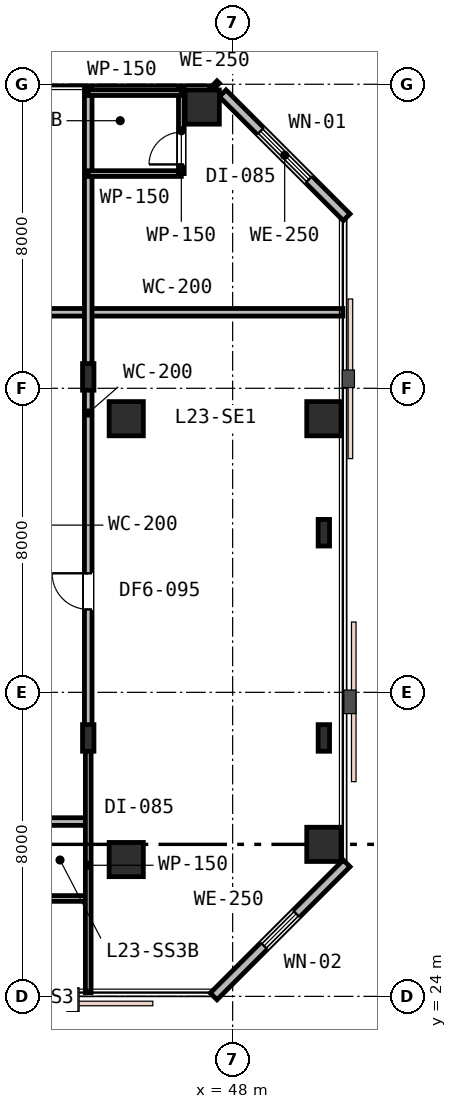
"""IFC4 building model, lengths in metres.
Left out: names, types, materials, properties, quantities, classifications, styles, units other than length and angle.
Written with IfcOpenShell. Run it as: python <this file> out.ifc"""

import sys

from ifc_helpers import new_model, si_unit, direction, frame, frame_2d, origin, origin_2d, place, context, subcontext, project, spatial, rectangle, i_section, extrude, element, fill, save


model = new_model("IFC4")
c1 = context("Model", 3, precision=1e-05, world=origin(), true_north=direction((0.0, 1.0)))
c2 = subcontext(c1, "Body", "Model", "MODEL_VIEW")
j1 = project(units=[si_unit("LENGTHUNIT", "METRE"), si_unit("PLANEANGLEUNIT", "RADIAN")], contexts=[c1])
p1 = place(None, origin())
s1 = spatial("IfcSite", under=j1, at=p1, CompositionType="ELEMENT")
p2 = place(p1, origin())
s2 = spatial("IfcBuilding", under=s1, at=p2, CompositionType="ELEMENT")
p3 = place(p2, frame((0.0, 0.0, 93.6)))
s3 = spatial("IfcBuildingStorey", under=s2, at=p3, CompositionType="ELEMENT", Elevation=93.6)
for number, where, z_axis, x_axis in (
    (1, (45.2, 27.6, 0.0), (0.0, 0.0, 1.0), (1.0, 0.0, 0.0)),
    (2, (45.2, 39.2, 0.0), (0.0, 0.0, 1.0), (1.0, 0.0, 0.0)),
    (3, (47.2, 47.4, 0.0), (0.0, 0.0, 1.0), (1.0, 0.0, 0.0)),
    (4, (50.4, 28.0, 0.0), (0.0, 0.0, 1.0), (1.0, 0.0, 0.0)),
    (5, (50.4, 39.2, 0.0), (0.0, 0.0, 1.0), (1.0, 0.0, 0.0)),
):
    element("IfcColumn", number, at=place(p3, frame(where, z_axis=z_axis, x_axis=x_axis)), inside=s3, PredefinedType="COLUMN", context=c2, shape_type="SweptSolid", body=[
        extrude(rectangle(XDim=0.9, YDim=0.9, at=origin_2d()), origin(), (0.0, 0.0, 1.0), 3.6),
    ])
for number, where, z_axis, x_axis in (
    (6, (44.2, 30.8, 0.0), (0.0, 0.0, 1.0), (1.0, 0.0, 0.0)),
    (7, (44.2, 40.3, 0.0), (0.0, 0.0, 1.0), (1.0, 0.0, 0.0)),
    (8, (50.4, 30.8, 0.0), (0.0, 0.0, 1.0), (1.0, 0.0, 0.0)),
    (9, (50.4, 36.2, 0.0), (0.0, 0.0, 1.0), (1.0, 0.0, 0.0)),
):
    element("IfcColumn", number, at=place(p3, frame(where, z_axis=z_axis, x_axis=x_axis)), inside=s3, PredefinedType="COLUMN", context=c2, shape_type="SweptSolid", body=[
        extrude(i_section(OverallWidth=0.3, OverallDepth=0.7, WebThickness=0.017, FlangeThickness=0.032, FilletRadius=0.027, at=origin_2d()), origin(), (0.0, 0.0, 1.0), 3.6),
    ])
p4 = place(p3, frame((47.5, 24.0, 0.0), z_axis=(0.0, 0.0, 1.0), x_axis=(0.707106781187, 0.707106781187, 0.0)))
e10 = element("IfcWall", 10, at=p4, inside=s3, PredefinedType="STANDARD", context=c2, shape_type="SweptSolid", body=[
    extrude(rectangle(XDim=4.95, YDim=0.25, at=frame_2d((2.475, 0.0))), origin(), (0.0, 0.0, 1.0), 3.33),
])
p5 = place(p4, frame((1.875, 0.0, 0.85)))
e11 = element("IfcOpeningElement", 11, at=p5, cuts=e10, PredefinedType="OPENING", context=c2, shape_type="SweptSolid", body=[
    extrude(rectangle(XDim=1.2, YDim=1.6, at=frame_2d((0.6, 0.8))), frame((0.0, 0.135, 0.0), z_axis=(0.0, -1.0, 0.0), x_axis=(1.0, 0.0, 0.0)), (0.0, 0.0, 1.0), 0.27),
])
p6 = place(p3, frame((51.0, 44.5, 0.0), z_axis=(0.0, 0.0, 1.0), x_axis=(-0.707106781187, 0.707106781187, 0.0)))
e12 = element("IfcWall", 12, at=p6, inside=s3, PredefinedType="STANDARD", context=c2, shape_type="SweptSolid", body=[
    extrude(rectangle(XDim=4.613, YDim=0.25, at=frame_2d((2.306, 0.0))), origin(), (0.0, 0.0, 1.0), 3.33),
])
p7 = place(p6, frame((1.406, 0.0, 0.75)))
e13 = element("IfcOpeningElement", 13, at=p7, cuts=e12, PredefinedType="OPENING", context=c2, shape_type="SweptSolid", body=[
    extrude(rectangle(XDim=1.8, YDim=1.85, at=frame_2d((0.9, 0.925))), frame((0.0, 0.135, 0.0), z_axis=(0.0, -1.0, 0.0), x_axis=(1.0, 0.0, 0.0)), (0.0, 0.0, 1.0), 0.27),
])
p8 = place(p3, frame((47.562, 47.938, 0.0), z_axis=(0.0, 0.0, 1.0), x_axis=(-0.707106781187, 0.707106781187, 0.0)))
e14 = element("IfcWall", 14, at=p8, inside=s3, PredefinedType="STANDARD", context=c2, shape_type="SweptSolid", body=[
    extrude(rectangle(XDim=0.087, YDim=0.25, at=frame_2d((0.044, 0.0))), origin(), (0.0, 0.0, 1.0), 3.33),
])
p9 = place(p3, frame((11.4, 28.6, 0.0), z_axis=(0.0, 0.0, 1.0), x_axis=(1.0, 0.0, 0.0)))
e15 = element("IfcWall", 15, at=p9, inside=s3, PredefinedType="PARTITIONING", context=c2, shape_type="SweptSolid", body=[
    extrude(rectangle(XDim=32.8, YDim=0.2, at=frame_2d((16.4, 0.0))), origin(), (0.0, 0.0, 1.0), 2.83),
])
p10 = place(p9, frame((14.7, 0.0, 0.0)))
e16 = element("IfcOpeningElement", 16, at=p10, cuts=e15, PredefinedType="OPENING", context=c2, shape_type="SweptSolid", body=[
    extrude(rectangle(XDim=0.95, YDim=2.15, at=frame_2d((0.475, 1.075))), frame((0.0, 0.11, 0.0), z_axis=(0.0, -1.0, 0.0), x_axis=(1.0, 0.0, 0.0)), (0.0, 0.0, 1.0), 0.22),
])
p11 = place(p9, frame((22.475, 0.0, 0.0)))
e17 = element("IfcOpeningElement", 17, at=p11, cuts=e15, PredefinedType="OPENING", context=c2, shape_type="SweptSolid", body=[
    extrude(rectangle(XDim=0.95, YDim=2.15, at=frame_2d((0.475, 1.075))), frame((0.0, 0.11, 0.0), z_axis=(0.0, -1.0, 0.0), x_axis=(1.0, 0.0, 0.0)), (0.0, 0.0, 1.0), 0.22),
])
p12 = place(p9, frame((28.985, 0.0, 0.0)))
e18 = element("IfcOpeningElement", 18, at=p12, cuts=e15, PredefinedType="OPENING", context=c2, shape_type="SweptSolid", body=[
    extrude(rectangle(XDim=0.95, YDim=2.15, at=frame_2d((0.475, 1.075))), frame((0.0, 0.11, 0.0), z_axis=(0.0, -1.0, 0.0), x_axis=(1.0, 0.0, 0.0)), (0.0, 0.0, 1.0), 0.22),
])
p13 = place(p3, frame((42.2, 42.0, 0.0), z_axis=(0.0, 0.0, 1.0), x_axis=(1.0, 0.0, 0.0)))
e19 = element("IfcWall", 19, at=p13, inside=s3, PredefinedType="PARTITIONING", context=c2, shape_type="SweptSolid", body=[
    extrude(rectangle(XDim=8.7, YDim=0.2, at=frame_2d((4.35, 0.0))), origin(), (0.0, 0.0, 1.0), 3.33),
])
p14 = place(p3, frame((42.35, 26.576, 0.0), z_axis=(0.0, 0.0, 1.0), x_axis=(1.0, 0.0, 0.0)))
e20 = element("IfcWall", 20, at=p14, inside=s3, PredefinedType="PARTITIONING", context=c2, shape_type="SweptSolid", body=[
    extrude(rectangle(XDim=1.85, YDim=0.15, at=frame_2d((0.925, 0.0))), origin(), (0.0, 0.0, 1.0), 3.33),
])
p15 = place(p3, frame((44.2, 30.8, 0.0), z_axis=(0.0, 0.0, 1.0), x_axis=(0.0, -1.0, 0.0)))
e21 = element("IfcWall", 21, at=p15, inside=s3, PredefinedType="PARTITIONING", context=c2, shape_type="SweptSolid", body=[
    extrude(rectangle(XDim=6.7, YDim=0.15, at=frame_2d((3.35, 0.0))), origin(), (0.0, 0.0, 1.0), 2.83),
])
p16 = place(p3, frame((44.2, 30.8, 0.0), z_axis=(0.0, 0.0, 1.0), x_axis=(0.0, 1.0, 0.0)))
e22 = element("IfcWall", 22, at=p16, inside=s3, PredefinedType="PARTITIONING", context=c2, shape_type="SweptSolid", body=[
    extrude(rectangle(XDim=17.1, YDim=0.2, at=frame_2d((8.55, 0.0))), origin(), (0.0, 0.0, 1.0), 2.83),
])
p17 = place(p16, frame((3.382, 0.0, 0.0)))
e23 = element("IfcOpeningElement", 23, at=p17, cuts=e22, PredefinedType="OPENING", context=c2, shape_type="SweptSolid", body=[
    extrude(rectangle(XDim=0.95, YDim=2.15, at=frame_2d((0.475, 1.075))), frame((0.0, 0.11, 0.0), z_axis=(0.0, -1.0, 0.0), x_axis=(1.0, 0.0, 0.0)), (0.0, 0.0, 1.0), 0.22),
])
p18 = place(p3, frame((44.2, 45.65, 0.0), z_axis=(0.0, 0.0, 1.0), x_axis=(1.0, 0.0, 0.0)))
e24 = element("IfcWall", 24, at=p18, inside=s3, PredefinedType="PARTITIONING", context=c2, shape_type="SweptSolid", body=[
    extrude(rectangle(XDim=2.45, YDim=0.15, at=frame_2d((1.225, 0.0))), origin(), (0.0, 0.0, 1.0), 3.33),
])
p19 = place(p3, frame((46.65, 45.65, 0.0), z_axis=(0.0, 0.0, 1.0), x_axis=(0.0, 1.0, 0.0)))
e25 = element("IfcWall", 25, at=p19, inside=s3, PredefinedType="PARTITIONING", context=c2, shape_type="SweptSolid", body=[
    extrude(rectangle(XDim=2.25, YDim=0.15, at=frame_2d((1.125, 0.0))), origin(), (0.0, 0.0, 1.0), 2.92),
])
p20 = place(p19, frame((0.24, 0.0, 0.0)))
e26 = element("IfcOpeningElement", 26, at=p20, cuts=e25, PredefinedType="OPENING", context=c2, shape_type="SweptSolid", body=[
    extrude(rectangle(XDim=0.85, YDim=2.15, at=frame_2d((0.425, 1.075))), frame((0.0, 0.085, 0.0), z_axis=(0.0, -1.0, 0.0), x_axis=(1.0, 0.0, 0.0)), (0.0, 0.0, 1.0), 0.17),
])
p21 = place(p3, frame((44.2, 47.78, 0.0), z_axis=(0.0, 0.0, 1.0), x_axis=(1.0, 0.0, 0.0)))
e27 = element("IfcWall", 27, at=p21, inside=s3, PredefinedType="PARTITIONING", context=c2, shape_type="SweptSolid", body=[
    extrude(rectangle(XDim=2.45, YDim=0.15, at=frame_2d((1.225, 0.0))), origin(), (0.0, 0.0, 1.0), 2.92),
])
p22 = place(p5, origin())
e28 = element("IfcWindow", 28, at=p22, inside=s3, PartitioningType="SINGLE_PANEL", PredefinedType="WINDOW", context=c2, shape_type="SweptSolid", body=[
    extrude(rectangle(XDim=1.2, YDim=1.6, at=frame_2d((0.6, 0.8))), frame((0.0, 0.03, 0.0), z_axis=(0.0, -1.0, 0.0), x_axis=(1.0, 0.0, 0.0)), (0.0, 0.0, 1.0), 0.06),
])
fill(e11, e28)
p23 = place(p7, origin())
e29 = element("IfcWindow", 29, at=p23, inside=s3, PartitioningType="SINGLE_PANEL", PredefinedType="WINDOW", context=c2, shape_type="SweptSolid", body=[
    extrude(rectangle(XDim=1.8, YDim=1.85, at=frame_2d((0.9, 0.925))), frame((0.0, 0.03, 0.0), z_axis=(0.0, -1.0, 0.0), x_axis=(1.0, 0.0, 0.0)), (0.0, 0.0, 1.0), 0.06),
])
fill(e13, e29)
p24 = place(p17, origin())
e30 = element("IfcDoor", 30, at=p24, inside=s3, OperationType="SINGLE_SWING_RIGHT", PredefinedType="DOOR", context=c2, shape_type="SweptSolid", body=[
    extrude(rectangle(XDim=0.95, YDim=2.15, at=frame_2d((0.475, 1.075))), frame((0.0, 0.025, 0.0), z_axis=(0.0, -1.0, 0.0), x_axis=(1.0, 0.0, 0.0)), (0.0, 0.0, 1.0), 0.05),
])
fill(e23, e30)
p25 = place(p20, origin())
e31 = element("IfcDoor", 31, at=p25, inside=s3, OperationType="SINGLE_SWING_LEFT", PredefinedType="DOOR", context=c2, shape_type="SweptSolid", body=[
    extrude(rectangle(XDim=0.85, YDim=2.15, at=frame_2d((0.425, 1.075))), frame((0.0, 0.025, 0.0), z_axis=(0.0, -1.0, 0.0), x_axis=(1.0, 0.0, 0.0)), (0.0, 0.0, 1.0), 0.05),
])
fill(e26, e31)
save(model, sys.argv[1])
